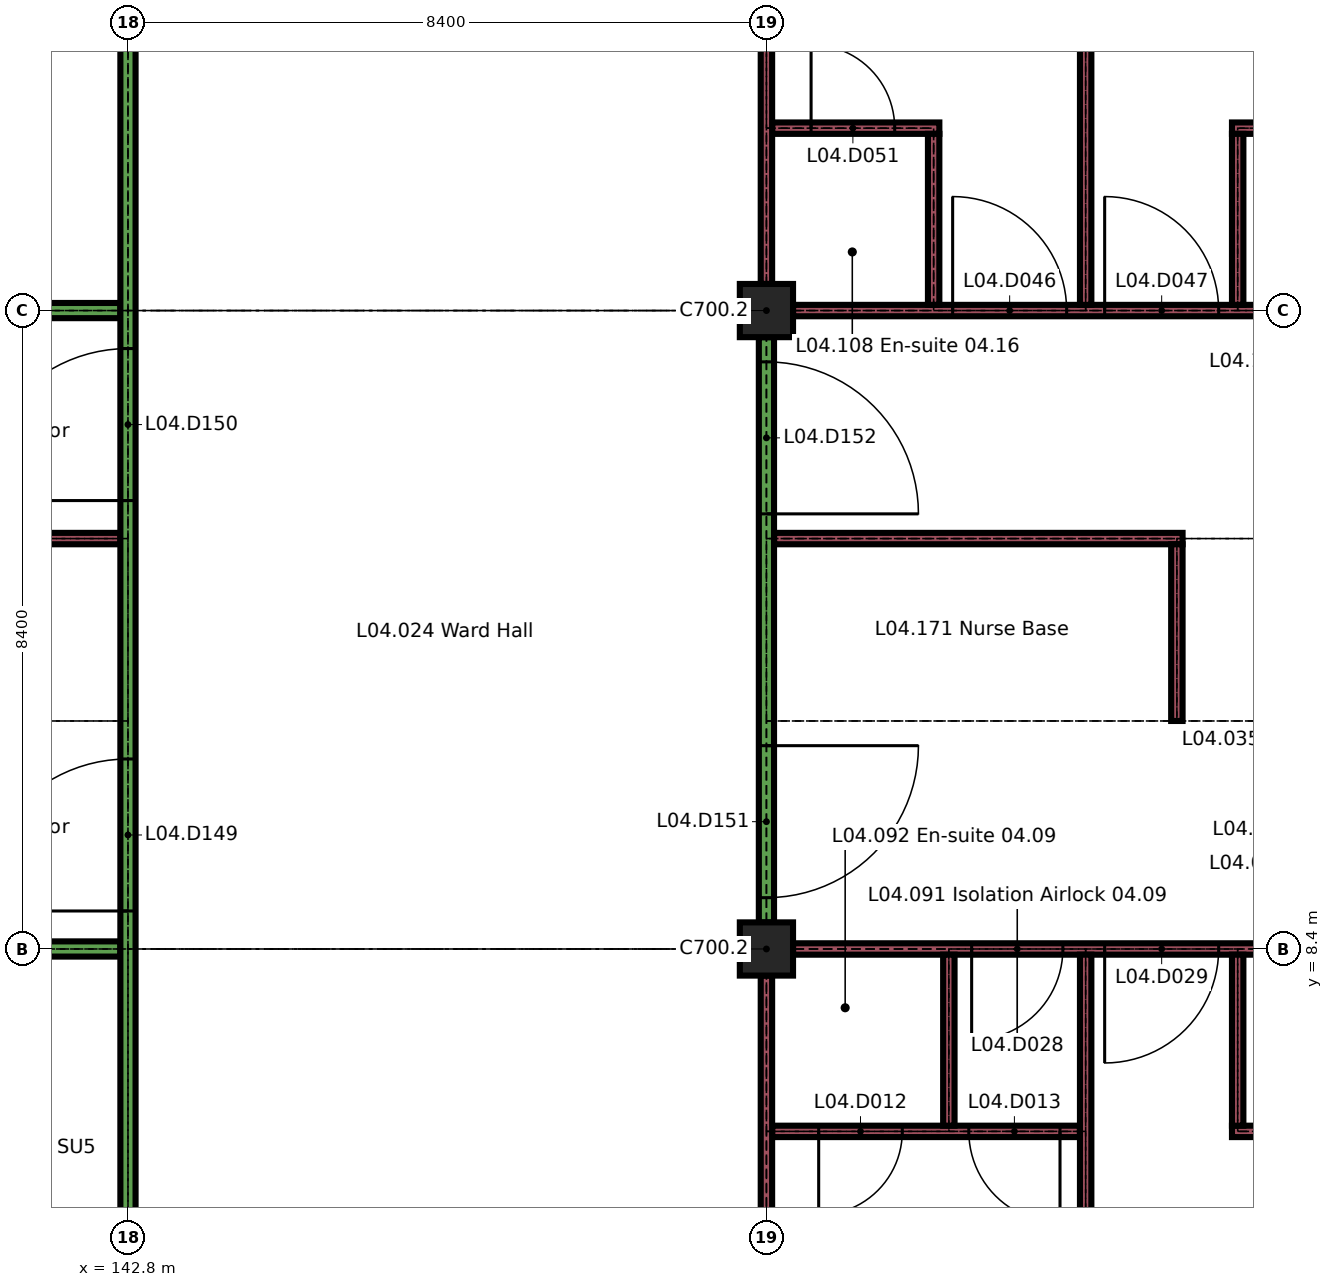
"""IFC4 building model, lengths in metres.
Left out: names, types, materials, properties, quantities, classifications, styles, units other than length and angle.
Written with IfcOpenShell. Run it as: python <this file> out.ifc"""

import sys

from ifc_helpers import new_model, si_unit, direction, frame, frame_2d, origin, origin_2d, place, context, subcontext, project, spatial, rectangle, extrude, element, fill, save


model = new_model("IFC4")
c1 = context("Model", 3, precision=1e-05, world=origin(), true_north=direction((0.0, 1.0)))
c2 = subcontext(c1, "Body", "Model", "MODEL_VIEW")
j1 = project(units=[si_unit("LENGTHUNIT", "METRE"), si_unit("PLANEANGLEUNIT", "RADIAN")], contexts=[c1])
p1 = place(None, origin())
s1 = spatial("IfcSite", under=j1, at=p1, CompositionType="ELEMENT")
p2 = place(p1, origin())
s2 = spatial("IfcBuilding", under=s1, at=p2, CompositionType="ELEMENT")
p3 = place(p2, frame((0.0, 0.0, 18.9)))
s3 = spatial("IfcBuildingStorey", under=s2, at=p3, CompositionType="ELEMENT", Elevation=18.9)
for number, where, z_axis, x_axis in (
    (1, (151.2, 8.4, 0.0), (0.0, 0.0, 1.0), (1.0, 0.0, 0.0)),
    (2, (151.2, 16.8, 0.0), (0.0, 0.0, 1.0), (1.0, 0.0, 0.0)),
):
    element("IfcColumn", number, at=place(p3, frame(where, z_axis=z_axis, x_axis=x_axis)), inside=s3, PredefinedType="COLUMN", context=c2, shape_type="SweptSolid", body=[
        extrude(rectangle(XDim=0.7, YDim=0.7, at=origin_2d()), origin(), (0.0, 0.0, 1.0), 3.26),
    ])
p4 = place(p3, frame((151.275, 6.0, 0.0), z_axis=(0.0, 0.0, 1.0), x_axis=(1.0, 0.0, 0.0)))
e3 = element("IfcWall", 3, at=p4, inside=s3, PredefinedType="PARTITIONING", context=c2, shape_type="SweptSolid", body=[
    extrude(rectangle(XDim=4.05, YDim=0.15, at=frame_2d((2.025, 0.0))), origin(), (0.0, 0.0, 1.0), 3.26),
])
p5 = place(p4, frame((0.613, 0.0, 0.0)))
e4 = element("IfcOpeningElement", 4, at=p5, cuts=e3, PredefinedType="OPENING", context=c2, shape_type="SweptSolid", body=[
    extrude(rectangle(XDim=1.1, YDim=2.1, at=frame_2d((0.55, 1.05))), frame((0.0, 0.085, 0.0), z_axis=(0.0, -1.0, 0.0), x_axis=(1.0, 0.0, 0.0)), (0.0, 0.0, 1.0), 0.17),
])
p6 = place(p4, frame((2.587, 0.0, 0.0)))
e5 = element("IfcOpeningElement", 5, at=p6, cuts=e3, PredefinedType="OPENING", context=c2, shape_type="SweptSolid", body=[
    extrude(rectangle(XDim=1.2, YDim=2.1, at=frame_2d((0.6, 1.05))), frame((0.0, 0.085, 0.0), z_axis=(0.0, -1.0, 0.0), x_axis=(1.0, 0.0, 0.0)), (0.0, 0.0, 1.0), 0.17),
])
p7 = place(p3, frame((157.325, 6.0, 0.0), z_axis=(0.0, 0.0, 1.0), x_axis=(1.0, 0.0, 0.0)))
e6 = element("IfcWall", 6, at=p7, inside=s3, PredefinedType="PARTITIONING", context=c2, shape_type="SweptSolid", body=[
    extrude(rectangle(XDim=4.55, YDim=0.15, at=frame_2d((2.275, 0.0))), origin(), (0.0, 0.0, 1.0), 3.26),
])
p8 = place(p7, frame((0.625, 0.0, 0.0)))
e7 = element("IfcOpeningElement", 7, at=p8, cuts=e6, PredefinedType="OPENING", context=c2, shape_type="SweptSolid", body=[
    extrude(rectangle(XDim=1.1, YDim=2.1, at=frame_2d((0.55, 1.05))), frame((0.0, 0.085, 0.0), z_axis=(0.0, -1.0, 0.0), x_axis=(1.0, 0.0, 0.0)), (0.0, 0.0, 1.0), 0.17),
])
p9 = place(p7, frame((2.825, 0.0, 0.0)))
e8 = element("IfcOpeningElement", 8, at=p9, cuts=e6, PredefinedType="OPENING", context=c2, shape_type="SweptSolid", body=[
    extrude(rectangle(XDim=1.1, YDim=2.1, at=frame_2d((0.55, 1.05))), frame((0.0, 0.085, 0.0), z_axis=(0.0, -1.0, 0.0), x_axis=(1.0, 0.0, 0.0)), (0.0, 0.0, 1.0), 0.17),
])
p10 = place(p3, frame((134.5, 8.4, 0.0), z_axis=(0.0, 0.0, 1.0), x_axis=(1.0, 0.0, 0.0)))
e9 = element("IfcWall", 9, at=p10, inside=s3, PredefinedType="PARTITIONING", context=c2, shape_type="SweptSolid", body=[
    extrude(rectangle(XDim=8.2, YDim=0.2, at=frame_2d((4.1, 0.0))), origin(), (0.0, 0.0, 1.0), 3.26),
])
p11 = place(p10, frame((3.1, 0.0, 0.0)))
e10 = element("IfcOpeningElement", 10, at=p11, cuts=e9, PredefinedType="OPENING", context=c2, shape_type="SweptSolid", body=[
    extrude(rectangle(XDim=2.0, YDim=2.4, at=frame_2d((1.0, 1.2))), frame((0.0, 0.11, 0.0), z_axis=(0.0, -1.0, 0.0), x_axis=(1.0, 0.0, 0.0)), (0.0, 0.0, 1.0), 0.22),
])
p12 = place(p3, frame((151.55, 8.4, 0.0), z_axis=(0.0, 0.0, 1.0), x_axis=(1.0, 0.0, 0.0)))
e11 = element("IfcWall", 11, at=p12, inside=s3, PredefinedType="PARTITIONING", context=c2, shape_type="SweptSolid", body=[
    extrude(rectangle(XDim=7.7, YDim=0.15, at=frame_2d((3.85, 0.0))), origin(), (0.0, 0.0, 1.0), 3.26),
])
p13 = place(p12, frame((2.35, 0.0, 0.0)))
e12 = element("IfcOpeningElement", 12, at=p13, cuts=e11, PredefinedType="OPENING", context=c2, shape_type="SweptSolid", body=[
    extrude(rectangle(XDim=1.2, YDim=2.1, at=frame_2d((0.6, 1.05))), frame((0.0, 0.085, 0.0), z_axis=(0.0, -1.0, 0.0), x_axis=(1.0, 0.0, 0.0)), (0.0, 0.0, 1.0), 0.17),
])
p14 = place(p12, frame((4.1, 0.0, 0.0)))
e13 = element("IfcOpeningElement", 13, at=p14, cuts=e11, PredefinedType="OPENING", context=c2, shape_type="SweptSolid", body=[
    extrude(rectangle(XDim=1.5, YDim=2.4, at=frame_2d((0.75, 1.2))), frame((0.0, 0.085, 0.0), z_axis=(0.0, -1.0, 0.0), x_axis=(1.0, 0.0, 0.0)), (0.0, 0.0, 1.0), 0.17),
])
p15 = place(p3, frame((134.5, 13.8, 0.0), z_axis=(0.0, 0.0, 1.0), x_axis=(1.0, 0.0, 0.0)))
e14 = element("IfcWall", 14, at=p15, inside=s3, PredefinedType="PARTITIONING", context=c2, shape_type="SweptSolid", body=[
    extrude(rectangle(XDim=8.2, YDim=0.15, at=frame_2d((4.1, 0.0))), origin(), (0.0, 0.0, 1.0), 3.26),
])
p16 = place(p3, frame((151.3, 13.8, 0.0), z_axis=(0.0, 0.0, 1.0), x_axis=(1.0, 0.0, 0.0)))
e15 = element("IfcWall", 15, at=p16, inside=s3, PredefinedType="PARTITIONING", context=c2, shape_type="SweptSolid", body=[
    extrude(rectangle(XDim=5.375, YDim=0.15, at=frame_2d((2.688, 0.0))), origin(), (0.0, 0.0, 1.0), 3.26),
])
p17 = place(p3, frame((117.5, 16.8, 0.0), z_axis=(0.0, 0.0, 1.0), x_axis=(1.0, 0.0, 0.0)))
e16 = element("IfcWall", 16, at=p17, inside=s3, PredefinedType="PARTITIONING", context=c2, shape_type="SweptSolid", body=[
    extrude(rectangle(XDim=25.2, YDim=0.2, at=frame_2d((12.6, 0.0))), origin(), (0.0, 0.0, 1.0), 3.26),
])
p18 = place(p17, frame((3.3, 0.0, 0.0)))
e17 = element("IfcOpeningElement", 17, at=p18, cuts=e16, PredefinedType="OPENING", context=c2, shape_type="SweptSolid", body=[
    extrude(rectangle(XDim=2.0, YDim=2.4, at=frame_2d((1.0, 1.2))), frame((0.0, 0.11, 0.0), z_axis=(0.0, -1.0, 0.0), x_axis=(1.0, 0.0, 0.0)), (0.0, 0.0, 1.0), 0.22),
])
p19 = place(p17, frame((20.05, 0.0, 0.0)))
e18 = element("IfcOpeningElement", 18, at=p19, cuts=e16, PredefinedType="OPENING", context=c2, shape_type="SweptSolid", body=[
    extrude(rectangle(XDim=2.0, YDim=2.4, at=frame_2d((1.0, 1.2))), frame((0.0, 0.11, 0.0), z_axis=(0.0, -1.0, 0.0), x_axis=(1.0, 0.0, 0.0)), (0.0, 0.0, 1.0), 0.22),
])
p20 = place(p3, frame((151.55, 16.8, 0.0), z_axis=(0.0, 0.0, 1.0), x_axis=(1.0, 0.0, 0.0)))
e19 = element("IfcWall", 19, at=p20, inside=s3, PredefinedType="PARTITIONING", context=c2, shape_type="SweptSolid", body=[
    extrude(rectangle(XDim=8.05, YDim=0.15, at=frame_2d((4.025, 0.0))), origin(), (0.0, 0.0, 1.0), 3.26),
])
p21 = place(p20, frame((2.1, 0.0, 0.0)))
e20 = element("IfcOpeningElement", 20, at=p21, cuts=e19, PredefinedType="OPENING", context=c2, shape_type="SweptSolid", body=[
    extrude(rectangle(XDim=1.5, YDim=2.4, at=frame_2d((0.75, 1.2))), frame((0.0, 0.085, 0.0), z_axis=(0.0, -1.0, 0.0), x_axis=(1.0, 0.0, 0.0)), (0.0, 0.0, 1.0), 0.17),
])
p22 = place(p20, frame((4.1, 0.0, 0.0)))
e21 = element("IfcOpeningElement", 21, at=p22, cuts=e19, PredefinedType="OPENING", context=c2, shape_type="SweptSolid", body=[
    extrude(rectangle(XDim=1.5, YDim=2.4, at=frame_2d((0.75, 1.2))), frame((0.0, 0.085, 0.0), z_axis=(0.0, -1.0, 0.0), x_axis=(1.0, 0.0, 0.0)), (0.0, 0.0, 1.0), 0.17),
])
p23 = place(p3, frame((151.275, 19.2, 0.0), z_axis=(0.0, 0.0, 1.0), x_axis=(1.0, 0.0, 0.0)))
e22 = element("IfcWall", 22, at=p23, inside=s3, PredefinedType="PARTITIONING", context=c2, shape_type="SweptSolid", body=[
    extrude(rectangle(XDim=2.2, YDim=0.15, at=frame_2d((1.1, 0.0))), origin(), (0.0, 0.0, 1.0), 3.26),
])
p24 = place(p23, frame((0.512, 0.0, 0.0)))
e23 = element("IfcOpeningElement", 23, at=p24, cuts=e22, PredefinedType="OPENING", context=c2, shape_type="SweptSolid", body=[
    extrude(rectangle(XDim=1.1, YDim=2.1, at=frame_2d((0.55, 1.05))), frame((0.0, 0.085, 0.0), z_axis=(0.0, -1.0, 0.0), x_axis=(1.0, 0.0, 0.0)), (0.0, 0.0, 1.0), 0.17),
])
p25 = place(p3, frame((157.325, 19.2, 0.0), z_axis=(0.0, 0.0, 1.0), x_axis=(1.0, 0.0, 0.0)))
e24 = element("IfcWall", 24, at=p25, inside=s3, PredefinedType="PARTITIONING", context=c2, shape_type="SweptSolid", body=[
    extrude(rectangle(XDim=2.175, YDim=0.15, at=frame_2d((1.087, 0.0))), origin(), (0.0, 0.0, 1.0), 3.26),
])
p26 = place(p25, frame((0.575, 0.0, 0.0)))
e25 = element("IfcOpeningElement", 25, at=p26, cuts=e24, PredefinedType="OPENING", context=c2, shape_type="SweptSolid", body=[
    extrude(rectangle(XDim=1.1, YDim=2.1, at=frame_2d((0.55, 1.05))), frame((0.0, 0.085, 0.0), z_axis=(0.0, -1.0, 0.0), x_axis=(1.0, 0.0, 0.0)), (0.0, 0.0, 1.0), 0.17),
])
p27 = place(p3, frame((142.8, 3.6, 0.0), z_axis=(0.0, 0.0, 1.0), x_axis=(0.0, 1.0, 0.0)))
e26 = element("IfcWall", 26, at=p27, inside=s3, PredefinedType="PARTITIONING", context=c2, shape_type="SweptSolid", body=[
    extrude(rectangle(XDim=18.0, YDim=0.2, at=frame_2d((9.0, 0.0))), origin(), (0.0, 0.0, 1.0), 3.26),
])
p28 = place(p27, frame((5.3, 0.0, 0.0)))
e27 = element("IfcOpeningElement", 27, at=p28, cuts=e26, PredefinedType="OPENING", context=c2, shape_type="SweptSolid", body=[
    extrude(rectangle(XDim=2.0, YDim=2.4, at=frame_2d((1.0, 1.2))), frame((0.0, 0.11, 0.0), z_axis=(0.0, -1.0, 0.0), x_axis=(1.0, 0.0, 0.0)), (0.0, 0.0, 1.0), 0.22),
])
p29 = place(p27, frame((10.7, 0.0, 0.0)))
e28 = element("IfcOpeningElement", 28, at=p29, cuts=e26, PredefinedType="OPENING", context=c2, shape_type="SweptSolid", body=[
    extrude(rectangle(XDim=2.0, YDim=2.4, at=frame_2d((1.0, 1.2))), frame((0.0, 0.11, 0.0), z_axis=(0.0, -1.0, 0.0), x_axis=(1.0, 0.0, 0.0)), (0.0, 0.0, 1.0), 0.22),
])
p30 = place(p3, frame((151.2, 0.35, 0.0), z_axis=(0.0, 0.0, 1.0), x_axis=(0.0, 1.0, 0.0)))
e29 = element("IfcWall", 29, at=p30, inside=s3, PredefinedType="PARTITIONING", context=c2, shape_type="SweptSolid", body=[
    extrude(rectangle(XDim=7.7, YDim=0.15, at=frame_2d((3.85, 0.0))), origin(), (0.0, 0.0, 1.0), 3.26),
])
p31 = place(p3, frame((151.2, 8.75, 0.0), z_axis=(0.0, 0.0, 1.0), x_axis=(0.0, 1.0, 0.0)))
e30 = element("IfcWall", 30, at=p31, inside=s3, PredefinedType="PARTITIONING", context=c2, shape_type="SweptSolid", body=[
    extrude(rectangle(XDim=7.7, YDim=0.2, at=frame_2d((3.85, 0.0))), origin(), (0.0, 0.0, 1.0), 3.26),
])
p32 = place(p31, frame((0.325, 0.0, 0.0)))
e31 = element("IfcOpeningElement", 31, at=p32, cuts=e30, PredefinedType="OPENING", context=c2, shape_type="SweptSolid", body=[
    extrude(rectangle(XDim=2.0, YDim=2.4, at=frame_2d((1.0, 1.2))), frame((0.0, 0.11, 0.0), z_axis=(0.0, -1.0, 0.0), x_axis=(1.0, 0.0, 0.0)), (0.0, 0.0, 1.0), 0.22),
])
p33 = place(p31, frame((5.375, 0.0, 0.0)))
e32 = element("IfcOpeningElement", 32, at=p33, cuts=e30, PredefinedType="OPENING", context=c2, shape_type="SweptSolid", body=[
    extrude(rectangle(XDim=2.0, YDim=2.4, at=frame_2d((1.0, 1.2))), frame((0.0, 0.11, 0.0), z_axis=(0.0, -1.0, 0.0), x_axis=(1.0, 0.0, 0.0)), (0.0, 0.0, 1.0), 0.22),
])
p34 = place(p3, frame((151.2, 17.15, 0.0), z_axis=(0.0, 0.0, 1.0), x_axis=(0.0, 1.0, 0.0)))
e33 = element("IfcWall", 33, at=p34, inside=s3, PredefinedType="PARTITIONING", context=c2, shape_type="SweptSolid", body=[
    extrude(rectangle(XDim=7.7, YDim=0.15, at=frame_2d((3.85, 0.0))), origin(), (0.0, 0.0, 1.0), 3.26),
])
for number, where, z_axis, x_axis in (
    (34, (153.4, 16.875, 0.0), (0.0, 0.0, 1.0), (0.0, 1.0, 0.0)),
    (35, (153.6, 6.075, 0.0), (0.0, 0.0, 1.0), (0.0, 1.0, 0.0)),
):
    element("IfcWall", number, at=place(p3, frame(where, z_axis=z_axis, x_axis=x_axis)), inside=s3, PredefinedType="PARTITIONING", context=c2, shape_type="SweptSolid", body=[
        extrude(rectangle(XDim=2.25, YDim=0.15, at=frame_2d((1.125, 0.0))), origin(), (0.0, 0.0, 1.0), 3.26),
    ])
for number, where, z_axis, x_axis in (
    (36, (155.4, 0.15, 0.0), (0.0, 0.0, 1.0), (0.0, 1.0, 0.0)),
    (37, (155.4, 16.875, 0.0), (0.0, 0.0, 1.0), (0.0, 1.0, 0.0)),
):
    element("IfcWall", number, at=place(p3, frame(where, z_axis=z_axis, x_axis=x_axis)), inside=s3, PredefinedType="PARTITIONING", context=c2, shape_type="SweptSolid", body=[
        extrude(rectangle(XDim=8.175, YDim=0.15, at=frame_2d((4.087, 0.0))), origin(), (0.0, 0.0, 1.0), 3.26),
    ])
p35 = place(p3, frame((156.6, 11.4, 0.0), z_axis=(0.0, 0.0, 1.0), x_axis=(0.0, 1.0, 0.0)))
e38 = element("IfcWall", 38, at=p35, inside=s3, PredefinedType="PARTITIONING", context=c2, shape_type="SweptSolid", body=[
    extrude(rectangle(XDim=2.325, YDim=0.15, at=frame_2d((1.163, 0.0))), origin(), (0.0, 0.0, 1.0), 3.26),
])
for number, where, z_axis, x_axis in (
    (39, (157.4, 6.075, 0.0), (0.0, 0.0, 1.0), (0.0, 1.0, 0.0)),
    (40, (157.4, 16.875, 0.0), (0.0, 0.0, 1.0), (0.0, 1.0, 0.0)),
):
    element("IfcWall", number, at=place(p3, frame(where, z_axis=z_axis, x_axis=x_axis)), inside=s3, PredefinedType="PARTITIONING", context=c2, shape_type="SweptSolid", body=[
        extrude(rectangle(XDim=2.25, YDim=0.15, at=frame_2d((1.125, 0.0))), origin(), (0.0, 0.0, 1.0), 3.26),
    ])
p36 = place(p5, origin())
e41 = element("IfcDoor", 41, at=p36, inside=s3, OperationType="SINGLE_SWING_LEFT", PredefinedType="DOOR", context=c2, shape_type="SweptSolid", body=[
    extrude(rectangle(XDim=1.1, YDim=2.1, at=frame_2d((0.55, 1.05))), frame((0.0, 0.025, 0.0), z_axis=(0.0, -1.0, 0.0), x_axis=(1.0, 0.0, 0.0)), (0.0, 0.0, 1.0), 0.05),
])
fill(e4, e41)
p37 = place(p6, origin())
e42 = element("IfcDoor", 42, at=p37, inside=s3, OperationType="SINGLE_SWING_RIGHT", PredefinedType="DOOR", context=c2, shape_type="SweptSolid", body=[
    extrude(rectangle(XDim=1.2, YDim=2.1, at=frame_2d((0.6, 1.05))), frame((0.0, 0.05, 0.0), z_axis=(0.0, -1.0, 0.0), x_axis=(1.0, 0.0, 0.0)), (0.0, 0.0, 1.0), 0.1),
])
fill(e5, e42)
p38 = place(p13, origin())
e43 = element("IfcDoor", 43, at=p38, inside=s3, OperationType="SINGLE_SWING_LEFT", PredefinedType="DOOR", context=c2, shape_type="SweptSolid", body=[
    extrude(rectangle(XDim=1.2, YDim=2.1, at=frame_2d((0.6, 1.05))), frame((0.0, 0.05, 0.0), z_axis=(0.0, -1.0, 0.0), x_axis=(1.0, 0.0, 0.0)), (0.0, 0.0, 1.0), 0.1),
])
fill(e12, e43)
p39 = place(p14, origin())
e44 = element("IfcDoor", 44, at=p39, inside=s3, OperationType="SINGLE_SWING_LEFT", PredefinedType="DOOR", context=c2, shape_type="SweptSolid", body=[
    extrude(rectangle(XDim=1.5, YDim=2.4, at=frame_2d((0.75, 1.2))), frame((0.0, 0.03, 0.0), z_axis=(0.0, -1.0, 0.0), x_axis=(1.0, 0.0, 0.0)), (0.0, 0.0, 1.0), 0.06),
])
fill(e13, e44)
p40 = place(p21, origin())
e45 = element("IfcDoor", 45, at=p40, inside=s3, OperationType="SINGLE_SWING_RIGHT", PredefinedType="DOOR", context=c2, shape_type="SweptSolid", body=[
    extrude(rectangle(XDim=1.5, YDim=2.4, at=frame_2d((0.75, 1.2))), frame((0.0, 0.03, 0.0), z_axis=(0.0, -1.0, 0.0), x_axis=(1.0, 0.0, 0.0)), (0.0, 0.0, 1.0), 0.06),
])
fill(e20, e45)
p41 = place(p22, origin())
e46 = element("IfcDoor", 46, at=p41, inside=s3, OperationType="SINGLE_SWING_RIGHT", PredefinedType="DOOR", context=c2, shape_type="SweptSolid", body=[
    extrude(rectangle(XDim=1.5, YDim=2.4, at=frame_2d((0.75, 1.2))), frame((0.0, 0.03, 0.0), z_axis=(0.0, -1.0, 0.0), x_axis=(1.0, 0.0, 0.0)), (0.0, 0.0, 1.0), 0.06),
])
fill(e21, e46)
p42 = place(p24, origin())
e47 = element("IfcDoor", 47, at=p42, inside=s3, OperationType="SINGLE_SWING_RIGHT", PredefinedType="DOOR", context=c2, shape_type="SweptSolid", body=[
    extrude(rectangle(XDim=1.1, YDim=2.1, at=frame_2d((0.55, 1.05))), frame((0.0, 0.025, 0.0), z_axis=(0.0, -1.0, 0.0), x_axis=(1.0, 0.0, 0.0)), (0.0, 0.0, 1.0), 0.05),
])
fill(e23, e47)
p43 = place(p28, origin())
e48 = element("IfcDoor", 48, at=p43, inside=s3, OperationType="SINGLE_SWING_RIGHT", PredefinedType="DOOR", context=c2, shape_type="SweptSolid", body=[
    extrude(rectangle(XDim=2.0, YDim=2.4, at=frame_2d((1.0, 1.2))), frame((0.0, 0.03, 0.0), z_axis=(0.0, -1.0, 0.0), x_axis=(1.0, 0.0, 0.0)), (0.0, 0.0, 1.0), 0.06),
])
fill(e27, e48)
p44 = place(p29, origin())
e49 = element("IfcDoor", 49, at=p44, inside=s3, OperationType="SINGLE_SWING_RIGHT", PredefinedType="DOOR", context=c2, shape_type="SweptSolid", body=[
    extrude(rectangle(XDim=2.0, YDim=2.4, at=frame_2d((1.0, 1.2))), frame((0.0, 0.03, 0.0), z_axis=(0.0, -1.0, 0.0), x_axis=(1.0, 0.0, 0.0)), (0.0, 0.0, 1.0), 0.06),
])
fill(e28, e49)
p45 = place(p32, origin())
e50 = element("IfcDoor", 50, at=p45, inside=s3, OperationType="SINGLE_SWING_RIGHT", PredefinedType="DOOR", context=c2, shape_type="SweptSolid", body=[
    extrude(rectangle(XDim=2.0, YDim=2.4, at=frame_2d((1.0, 1.2))), frame((0.0, 0.03, 0.0), z_axis=(0.0, -1.0, 0.0), x_axis=(1.0, 0.0, 0.0)), (0.0, 0.0, 1.0), 0.06),
])
fill(e31, e50)
p46 = place(p33, origin())
e51 = element("IfcDoor", 51, at=p46, inside=s3, OperationType="SINGLE_SWING_LEFT", PredefinedType="DOOR", context=c2, shape_type="SweptSolid", body=[
    extrude(rectangle(XDim=2.0, YDim=2.4, at=frame_2d((1.0, 1.2))), frame((0.0, 0.03, 0.0), z_axis=(0.0, -1.0, 0.0), x_axis=(1.0, 0.0, 0.0)), (0.0, 0.0, 1.0), 0.06),
])
fill(e32, e51)
save(model, sys.argv[1])
